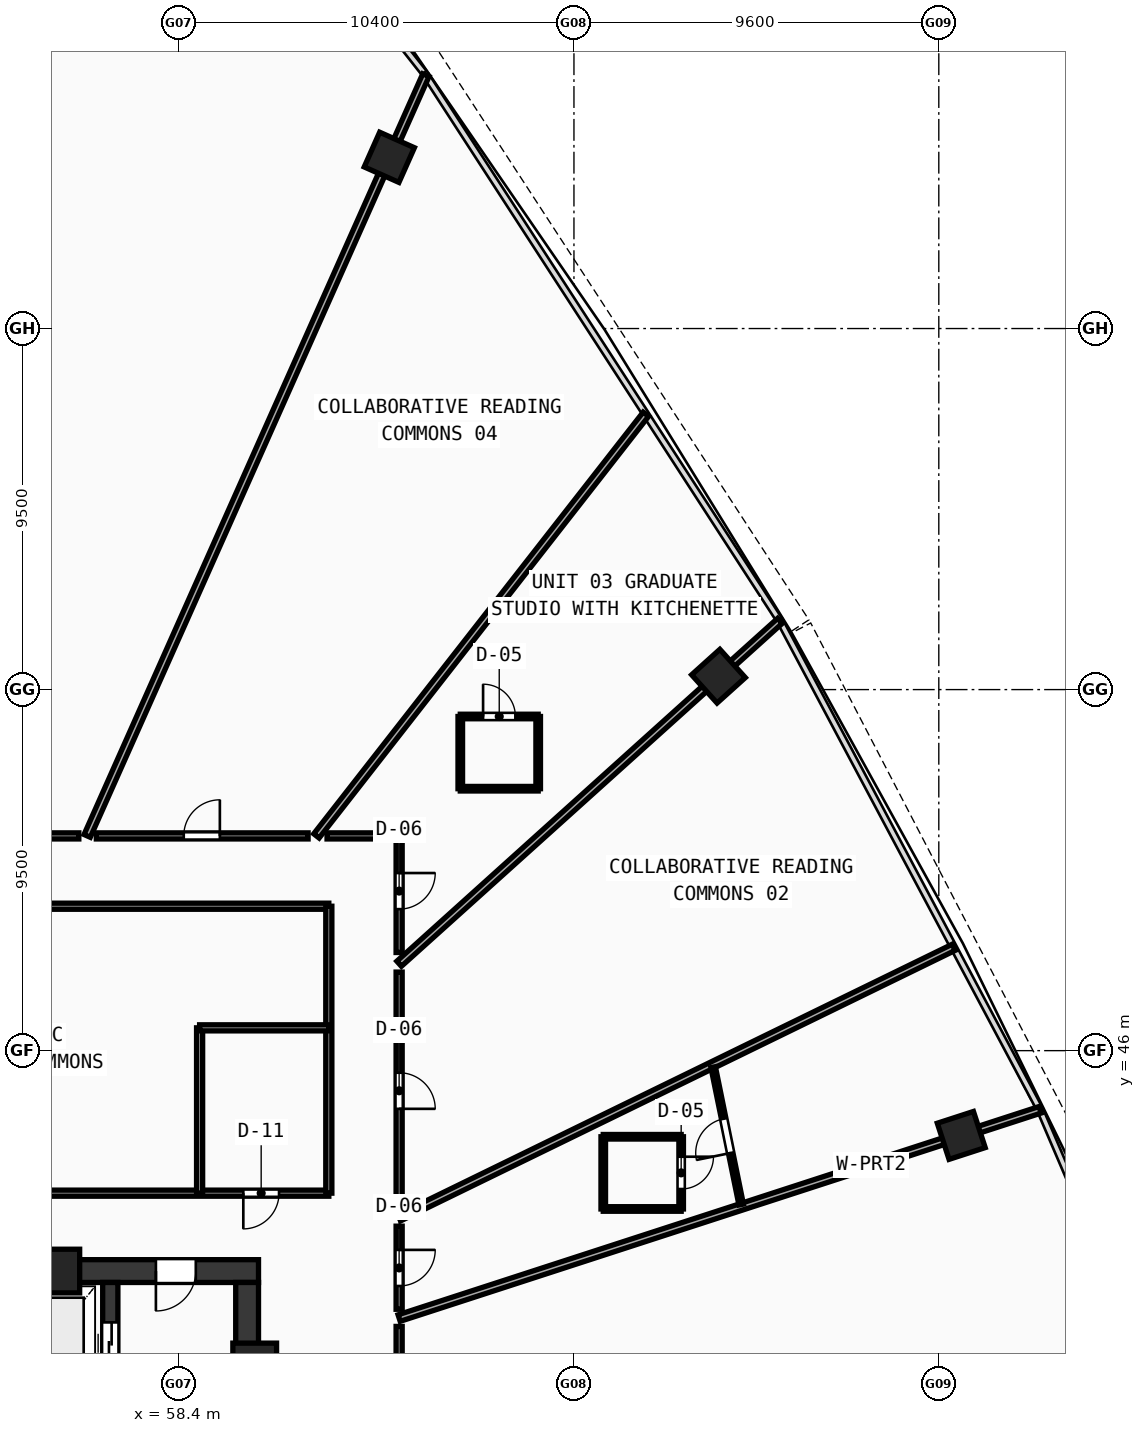
"""IFC4 building model, lengths in metres.
Left out: names, types, materials, properties, quantities, classifications, styles, units other than length and angle.
Written with IfcOpenShell. Run it as: python <this file> out.ifc"""

import sys

from ifc_helpers import new_model, si_unit, direction, frame, frame_2d, origin, origin_with_axes, origin_2d, place, context, subcontext, project, spatial, rectangle, hollow_rectangle, extrude, source, transform, mapped, element, fill, save


model = new_model("IFC4")
c1 = context("Model", 3, precision=1e-05, world=origin(), true_north=direction((0.0, 1.0)))
c2 = subcontext(c1, "Body", "Model", "MODEL_VIEW")
j1 = project(units=[si_unit("LENGTHUNIT", "METRE"), si_unit("PLANEANGLEUNIT", "RADIAN")], contexts=[c1])
p1 = place(None, origin())
s1 = spatial("IfcSite", under=j1, at=p1, CompositionType="ELEMENT")
p2 = place(p1, origin())
s2 = spatial("IfcBuilding", under=s1, at=p2, CompositionType="ELEMENT")
p3 = place(p2, frame((0.0, 0.0, 84.98)))
s3 = spatial("IfcBuildingStorey", under=s2, at=p3, CompositionType="ELEMENT", Elevation=84.98)
p4 = place(p3, frame((49.2, 40.2, 0.0), z_axis=(0.0, 0.0, 1.0), x_axis=(1.0, 0.0, 0.0)))
e1 = element("IfcWall", 1, at=p4, inside=s3, PredefinedType="SHEAR", context=c2, shape_type="SweptSolid", body=[
    extrude(rectangle(XDim=11.3, YDim=0.6, at=frame_2d((5.65, 0.0))), origin(), (0.0, 0.0, 1.0), 3.54),
])
p5 = place(p4, frame((8.6, 0.0, 0.0)))
e2 = element("IfcOpeningElement", 2, at=p5, cuts=e1, PredefinedType="OPENING", context=c2, shape_type="SweptSolid", body=[
    extrude(rectangle(XDim=1.05, YDim=2.1, at=frame_2d((0.525, 1.05))), frame((0.0, 0.31, 0.0), z_axis=(0.0, -1.0, 0.0), x_axis=(1.0, 0.0, 0.0)), (0.0, 0.0, 1.0), 0.62),
])
p6 = place(p3, frame((60.2, 27.8, 0.0), z_axis=(0.0, 0.0, 1.0), x_axis=(0.0, 1.0, 0.0)))
e3 = element("IfcWall", 3, at=p6, inside=s3, PredefinedType="SHEAR", context=c2, shape_type="SweptSolid", body=[
    extrude(rectangle(XDim=12.1, YDim=0.6, at=frame_2d((6.05, 0.0))), origin(), (0.0, 0.0, 1.0), 3.54),
])
p7 = place(p3, frame((56.6, 27.8, 0.0), z_axis=(0.0, 0.0, 1.0), x_axis=(0.0, 1.0, 0.0)))
e4 = element("IfcWall", 4, at=p7, inside=s3, PredefinedType="SHEAR", context=c2, shape_type="SweptSolid", body=[
    extrude(rectangle(XDim=12.1, YDim=0.4, at=frame_2d((6.05, 0.0))), origin(), (0.0, 0.0, 1.0), 3.54),
])
p8 = place(p7, frame((9.95, 0.0, 0.0)))
e5 = element("IfcOpeningElement", 5, at=p8, cuts=e4, PredefinedType="OPENING", context=c2, shape_type="SweptSolid", body=[
    extrude(rectangle(XDim=1.1, YDim=2.1, at=frame_2d((0.55, 1.05))), frame((0.0, 0.21, 0.0), z_axis=(0.0, -1.0, 0.0), x_axis=(1.0, 0.0, 0.0)), (0.0, 0.0, 1.0), 0.42),
])
m1 = source(origin(), c2, "Body", "SweptSolid", [
    extrude(hollow_rectangle(XDim=1.15, YDim=1.15, WallThickness=0.048, at=origin_2d()), origin(), (0.0, 0.0, 1.0), 3.8),
])
for number, where, z_axis, x_axis in (
    (6, (60.4, 37.729, -0.26), (0.0, 0.0, 1.0), (1.0, 0.0, 0.0)),
    (7, (55.219, 40.2, -0.26), (0.0, 0.0, 1.0), (1.0, 0.0, 0.0)),
):
    element("IfcColumn", number, at=place(p3, frame(where, z_axis=z_axis, x_axis=x_axis)), inside=s3, PredefinedType="COLUMN", context=c2, shape_type="MappedRepresentation", body=[
        mapped(m1, transform((0.0, 0.0, 0.0), scale=1.0)),
    ])
m2 = source(origin(), c2, "Body", "SweptSolid", [
    extrude(hollow_rectangle(XDim=1.0, YDim=1.0, WallThickness=0.042, at=origin_2d()), origin(), (0.0, 0.0, 1.0), 3.8),
])
for number, where, z_axis, x_axis in (
    (8, (78.991, 43.77, -0.26), (0.0, 0.0, 1.0), (-0.309, 0.951, 0.0)),
    (9, (72.603, 55.852, -0.26), (0.0, 0.0, 1.0), (-0.669, 0.743, 0.0)),
    (10, (63.941, 69.505, -0.26), (0.0, 0.0, 1.0), (-0.914, 0.407, 0.0)),
):
    element("IfcColumn", number, at=place(p3, frame(where, z_axis=z_axis, x_axis=x_axis)), inside=s3, PredefinedType="COLUMN", context=c2, shape_type="MappedRepresentation", body=[
        mapped(m2, transform((0.0, 0.0, 0.0), scale=1.0)),
    ])
p9 = place(p3, frame((45.92, 42.25, 0.0), z_axis=(0.0, 0.0, 1.0), x_axis=(1.0, 0.0, 0.0)))
e11 = element("IfcWall", 11, at=p9, inside=s3, PredefinedType="PARTITIONING", context=c2, shape_type="SweptSolid", body=[
    extrude(rectangle(XDim=16.43, YDim=0.16, at=frame_2d((8.215, 0.0))), origin(), (0.0, 0.0, 1.0), 2.84),
])
p10 = place(p9, frame((2.1, 0.0, 0.0)))
e12 = element("IfcOpeningElement", 12, at=p10, cuts=e11, PredefinedType="OPENING", context=c2, shape_type="SweptSolid", body=[
    extrude(rectangle(XDim=0.92, YDim=2.1, at=frame_2d((0.46, 1.05))), frame((0.0, 0.09, 0.0), z_axis=(0.0, -1.0, 0.0), x_axis=(1.0, 0.0, 0.0)), (0.0, 0.0, 1.0), 0.18),
])
p11 = place(p9, frame((14.18, 0.0, 0.0)))
e13 = element("IfcOpeningElement", 13, at=p11, cuts=e11, PredefinedType="OPENING", context=c2, shape_type="SweptSolid", body=[
    extrude(rectangle(XDim=0.94, YDim=2.1, at=frame_2d((0.47, 1.05))), frame((0.0, 0.09, 0.0), z_axis=(0.0, -1.0, 0.0), x_axis=(1.0, 0.0, 0.0)), (0.0, 0.0, 1.0), 0.18),
])
p12 = place(p3, frame((45.92, 49.8, 0.0), z_axis=(0.0, 0.0, 1.0), x_axis=(1.0, 0.0, 0.0)))
e14 = element("IfcWall", 14, at=p12, inside=s3, PredefinedType="PARTITIONING", context=c2, shape_type="SweptSolid", body=[
    extrude(rectangle(XDim=16.43, YDim=0.16, at=frame_2d((8.215, 0.0))), origin(), (0.0, 0.0, 1.0), 2.84),
])
p13 = place(p3, frame((62.35, 42.25, 0.0), z_axis=(0.0, 0.0, 1.0), x_axis=(0.0, 1.0, 0.0)))
e15 = element("IfcWall", 15, at=p13, inside=s3, PredefinedType="PARTITIONING", context=c2, shape_type="SweptSolid", body=[
    extrude(rectangle(XDim=7.55, YDim=0.16, at=frame_2d((3.775, 0.0))), origin(), (0.0, 0.0, 1.0), 2.84),
])
p14 = place(p3, frame((58.95, 42.25, 0.0), z_axis=(0.0, 0.0, 1.0), x_axis=(0.0, 1.0, 0.0)))
e16 = element("IfcWall", 16, at=p14, inside=s3, PredefinedType="PARTITIONING", context=c2, shape_type="SweptSolid", body=[
    extrude(rectangle(XDim=4.35, YDim=0.16, at=frame_2d((2.175, 0.0))), origin(), (0.0, 0.0, 1.0), 2.84),
])
p15 = place(p3, frame((58.95, 46.6, 0.0), z_axis=(0.0, 0.0, 1.0), x_axis=(1.0, 0.0, 0.0)))
e17 = element("IfcWall", 17, at=p15, inside=s3, PredefinedType="PARTITIONING", context=c2, shape_type="SweptSolid", body=[
    extrude(rectangle(XDim=3.4, YDim=0.16, at=frame_2d((1.7, 0.0))), origin(), (0.0, 0.0, 1.0), 2.84),
])
p16 = place(p3, frame((64.2, 38.964, 0.0), z_axis=(0.0, 0.0, 1.0), x_axis=(0.951054301474, 0.309023810812, 0.0)))
e18 = element("IfcWall", 18, at=p16, inside=s3, PredefinedType="PARTITIONING", context=c2, shape_type="SweptSolid", body=[
    extrude(rectangle(XDim=17.733, YDim=0.18, at=frame_2d((8.867, 0.0))), origin(), (0.0, 0.0, 1.0), 2.84),
])
p17 = place(p3, frame((64.2, 41.601, 0.0), z_axis=(0.0, 0.0, 1.0), x_axis=(0.898796049991, 0.438367038588, 0.0)))
e19 = element("IfcWall", 19, at=p17, inside=s3, PredefinedType="PARTITIONING", context=c2, shape_type="SweptSolid", body=[
    extrude(rectangle(XDim=16.234, YDim=0.18, at=frame_2d((8.117, 0.0))), origin(), (0.0, 0.0, 1.0), 2.84),
])
p18 = place(p3, frame((64.2, 48.287, 0.0), z_axis=(0.0, 0.0, 1.0), x_axis=(0.743149168899, 0.669125782469, 0.0)))
e20 = element("IfcWall", 20, at=p18, inside=s3, PredefinedType="PARTITIONING", context=c2, shape_type="SweptSolid", body=[
    extrude(rectangle(XDim=13.483, YDim=0.18, at=frame_2d((6.741, 0.0))), origin(), (0.0, 0.0, 1.0), 2.84),
])
p19 = place(p3, frame((62.024, 51.65, 0.0), z_axis=(0.0, 0.0, 1.0), x_axis=(0.615647406864, 0.788021744891, 0.0)))
e21 = element("IfcWall", 21, at=p19, inside=s3, PredefinedType="PARTITIONING", context=c2, shape_type="SweptSolid", body=[
    extrude(rectangle(XDim=14.08, YDim=0.18, at=frame_2d((7.04, 0.0))), origin(), (0.0, 0.0, 1.0), 2.84),
])
p20 = place(p3, frame((55.992, 51.65, 0.0), z_axis=(0.0, 0.0, 1.0), x_axis=(0.406733854264, 0.913546699296, 0.0)))
e22 = element("IfcWall", 22, at=p20, inside=s3, PredefinedType="PARTITIONING", context=c2, shape_type="SweptSolid", body=[
    extrude(rectangle(XDim=21.911, YDim=0.18, at=frame_2d((10.956, 0.0))), origin(), (0.0, 0.0, 1.0), 2.84),
])
p21 = place(p3, frame((45.85, 51.65, 0.0), z_axis=(0.0, 0.0, 1.0), x_axis=(1.0, 0.0, 0.0)))
e23 = element("IfcWall", 23, at=p21, inside=s3, PredefinedType="PARTITIONING", context=c2, shape_type="SweptSolid", body=[
    extrude(rectangle(XDim=9.922, YDim=0.16, at=frame_2d((4.961, 0.0))), origin(), (0.0, 0.0, 1.0), 2.84),
])
p22 = place(p21, frame((4.366, 0.0, 0.0)))
e24 = element("IfcOpeningElement", 24, at=p22, cuts=e23, PredefinedType="OPENING", context=c2, shape_type="SweptSolid", body=[
    extrude(rectangle(XDim=0.95, YDim=2.1, at=frame_2d((0.475, 1.05))), frame((0.0, 0.09, 0.0), z_axis=(0.0, -1.0, 0.0), x_axis=(1.0, 0.0, 0.0)), (0.0, 0.0, 1.0), 0.18),
])
p23 = place(p3, frame((56.233, 51.65, 0.0), z_axis=(0.0, 0.0, 1.0), x_axis=(1.0, 0.0, 0.0)))
e25 = element("IfcWall", 25, at=p23, inside=s3, PredefinedType="PARTITIONING", context=c2, shape_type="SweptSolid", body=[
    extrude(rectangle(XDim=5.572, YDim=0.16, at=frame_2d((2.786, 0.0))), origin(), (0.0, 0.0, 1.0), 3.54),
])
p24 = place(p23, frame((2.3, 0.0, 0.0)))
e26 = element("IfcOpeningElement", 26, at=p24, cuts=e25, PredefinedType="OPENING", context=c2, shape_type="SweptSolid", body=[
    extrude(rectangle(XDim=0.95, YDim=2.1, at=frame_2d((0.475, 1.05))), frame((0.0, 0.09, 0.0), z_axis=(0.0, -1.0, 0.0), x_axis=(1.0, 0.0, 0.0)), (0.0, 0.0, 1.0), 0.18),
])
p25 = place(p3, frame((62.303, 51.65, 0.0), z_axis=(0.0, 0.0, 1.0), x_axis=(1.0, 0.0, 0.0)))
e27 = element("IfcWall", 27, at=p25, inside=s3, PredefinedType="PARTITIONING", context=c2, shape_type="SweptSolid", body=[
    extrude(rectangle(XDim=1.897, YDim=0.16, at=frame_2d((0.948, 0.0))), origin(), (0.0, 0.0, 1.0), 3.54),
])
p26 = place(p3, frame((64.2, 51.65, 0.0), z_axis=(0.0, 0.0, 1.0), x_axis=(0.0, -1.0, 0.0)))
e28 = element("IfcWall", 28, at=p26, inside=s3, PredefinedType="PARTITIONING", context=c2, shape_type="SweptSolid", body=[
    extrude(rectangle(XDim=3.067, YDim=0.16, at=frame_2d((1.534, 0.0))), origin(), (0.0, 0.0, 1.0), 3.54),
])
p27 = place(p26, frame((0.977, 0.0, 0.0)))
e29 = element("IfcOpeningElement", 29, at=p27, cuts=e28, PredefinedType="OPENING", context=c2, shape_type="SweptSolid", body=[
    extrude(rectangle(XDim=0.95, YDim=2.1, at=frame_2d((0.475, 1.05))), frame((0.0, 0.09, 0.0), z_axis=(0.0, -1.0, 0.0), x_axis=(1.0, 0.0, 0.0)), (0.0, 0.0, 1.0), 0.18),
])
p28 = place(p3, frame((64.2, 48.067, 0.0), z_axis=(0.0, 0.0, 1.0), x_axis=(0.0, -1.0, 0.0)))
e30 = element("IfcWall", 30, at=p28, inside=s3, PredefinedType="PARTITIONING", context=c2, shape_type="SweptSolid", body=[
    extrude(rectangle(XDim=6.221, YDim=0.16, at=frame_2d((3.11, 0.0))), origin(), (0.0, 0.0, 1.0), 2.84),
])
p29 = place(p28, frame((2.648, 0.0, 0.0)))
e31 = element("IfcOpeningElement", 31, at=p29, cuts=e30, PredefinedType="OPENING", context=c2, shape_type="SweptSolid", body=[
    extrude(rectangle(XDim=0.95, YDim=2.1, at=frame_2d((0.475, 1.05))), frame((0.0, 0.09, 0.0), z_axis=(0.0, -1.0, 0.0), x_axis=(1.0, 0.0, 0.0)), (0.0, 0.0, 1.0), 0.18),
])
p30 = place(p3, frame((64.2, 41.382, 0.0), z_axis=(0.0, 0.0, 1.0), x_axis=(0.0, -1.0, 0.0)))
e32 = element("IfcWall", 32, at=p30, inside=s3, PredefinedType="PARTITIONING", context=c2, shape_type="SweptSolid", body=[
    extrude(rectangle(XDim=2.187, YDim=0.16, at=frame_2d((1.093, 0.0))), origin(), (0.0, 0.0, 1.0), 3.54),
])
p31 = place(p30, frame((0.624, 0.0, 0.0)))
e33 = element("IfcOpeningElement", 33, at=p31, cuts=e32, PredefinedType="OPENING", context=c2, shape_type="SweptSolid", body=[
    extrude(rectangle(XDim=0.95, YDim=2.1, at=frame_2d((0.475, 1.05))), frame((0.0, 0.09, 0.0), z_axis=(0.0, -1.0, 0.0), x_axis=(1.0, 0.0, 0.0)), (0.0, 0.0, 1.0), 0.18),
])
p32 = place(p3, frame((64.2, 38.744, 0.0), z_axis=(0.0, 0.0, 1.0), x_axis=(0.0, -1.0, 0.0)))
e34 = element("IfcWall", 34, at=p32, inside=s3, PredefinedType="PARTITIONING", context=c2, shape_type="SweptSolid", body=[
    extrude(rectangle(XDim=13.944, YDim=0.16, at=frame_2d((6.972, 0.0))), origin(), (0.0, 0.0, 1.0), 2.84),
])
p33 = place(p32, frame((6.617, 0.0, 0.0)))
e35 = element("IfcOpeningElement", 35, at=p33, cuts=e34, PredefinedType="OPENING", context=c2, shape_type="SweptSolid", body=[
    extrude(rectangle(XDim=0.95, YDim=2.1, at=frame_2d((0.475, 1.05))), frame((0.0, 0.09, 0.0), z_axis=(0.0, -1.0, 0.0), x_axis=(1.0, 0.0, 0.0)), (0.0, 0.0, 1.0), 0.18),
])
p34 = place(p3, frame((69.571, 41.834, 0.0), z_axis=(0.0, 0.0, 1.0), x_axis=(1.0, 0.0, 0.0)))
e36 = element("IfcWall", 36, at=p34, inside=s3, PredefinedType="PARTITIONING", context=c2, shape_type="SweptSolid", body=[
    extrude(rectangle(XDim=2.05, YDim=0.12, at=frame_2d((1.025, 0.0))), origin(), (0.0, 0.0, 1.0), 3.54),
])
p35 = place(p3, frame((71.621, 41.834, 0.0), z_axis=(0.0, 0.0, 1.0), x_axis=(0.0, 1.0, 0.0)))
e37 = element("IfcWall", 37, at=p35, inside=s3, PredefinedType="PARTITIONING", context=c2, shape_type="SweptSolid", body=[
    extrude(rectangle(XDim=1.9, YDim=0.12, at=frame_2d((0.95, 0.0))), origin(), (0.0, 0.0, 1.0), 3.14),
])
p36 = place(p35, frame((0.525, 0.0, 0.0)))
e38 = element("IfcOpeningElement", 38, at=p36, cuts=e37, PredefinedType="OPENING", context=c2, shape_type="SweptSolid", body=[
    extrude(rectangle(XDim=0.85, YDim=2.1, at=frame_2d((0.425, 1.05))), frame((0.0, 0.07, 0.0), z_axis=(0.0, -1.0, 0.0), x_axis=(1.0, 0.0, 0.0)), (0.0, 0.0, 1.0), 0.14),
])
p37 = place(p3, frame((71.621, 43.734, 0.0), z_axis=(0.0, 0.0, 1.0), x_axis=(-1.0, 0.0, 0.0)))
e39 = element("IfcWall", 39, at=p37, inside=s3, PredefinedType="PARTITIONING", context=c2, shape_type="SweptSolid", body=[
    extrude(rectangle(XDim=2.05, YDim=0.12, at=frame_2d((1.025, 0.0))), origin(), (0.0, 0.0, 1.0), 3.54),
])
p38 = place(p3, frame((69.571, 43.734, 0.0), z_axis=(0.0, 0.0, 1.0), x_axis=(0.0, -1.0, 0.0)))
e40 = element("IfcWall", 40, at=p38, inside=s3, PredefinedType="PARTITIONING", context=c2, shape_type="SweptSolid", body=[
    extrude(rectangle(XDim=1.9, YDim=0.12, at=frame_2d((0.95, 0.0))), origin(), (0.0, 0.0, 1.0), 3.54),
])
p39 = place(p3, frame((73.2, 41.951, 0.0), z_axis=(0.0, 0.0, 1.0), x_axis=(-0.199717476268, 0.979853524601, 0.0)))
e41 = element("IfcWall", 41, at=p39, inside=s3, PredefinedType="PARTITIONING", context=c2, shape_type="SweptSolid", body=[
    extrude(rectangle(XDim=3.688, YDim=0.12, at=frame_2d((1.844, 0.0))), origin(), (0.0, 0.0, 1.0), 2.84),
])
p40 = place(p39, frame((1.384, 0.0, 0.0)))
e42 = element("IfcOpeningElement", 42, at=p40, cuts=e41, PredefinedType="OPENING", context=c2, shape_type="SweptSolid", body=[
    extrude(rectangle(XDim=0.92, YDim=2.1, at=frame_2d((0.46, 1.05))), frame((0.0, 0.07, 0.0), z_axis=(0.0, -1.0, 0.0), x_axis=(1.0, 0.0, 0.0)), (0.0, 0.0, 1.0), 0.14),
])
p41 = place(p3, frame((65.809, 52.892, 0.0), z_axis=(0.0, 0.0, 1.0), x_axis=(1.0, 0.0, 0.0)))
e43 = element("IfcWall", 43, at=p41, inside=s3, PredefinedType="PARTITIONING", context=c2, shape_type="SweptSolid", body=[
    extrude(rectangle(XDim=2.05, YDim=0.12, at=frame_2d((1.025, 0.0))), origin(), (0.0, 0.0, 1.0), 3.54),
])
p42 = place(p3, frame((67.859, 52.892, 0.0), z_axis=(0.0, 0.0, 1.0), x_axis=(0.0, 1.0, 0.0)))
e44 = element("IfcWall", 44, at=p42, inside=s3, PredefinedType="PARTITIONING", context=c2, shape_type="SweptSolid", body=[
    extrude(rectangle(XDim=1.9, YDim=0.12, at=frame_2d((0.95, 0.0))), origin(), (0.0, 0.0, 1.0), 3.54),
])
p43 = place(p3, frame((67.859, 54.792, 0.0), z_axis=(0.0, 0.0, 1.0), x_axis=(-1.0, 0.0, 0.0)))
e45 = element("IfcWall", 45, at=p43, inside=s3, PredefinedType="PARTITIONING", context=c2, shape_type="SweptSolid", body=[
    extrude(rectangle(XDim=2.05, YDim=0.12, at=frame_2d((1.025, 0.0))), origin(), (0.0, 0.0, 1.0), 3.54),
])
p44 = place(p43, frame((0.6, 0.0, 0.0)))
e46 = element("IfcOpeningElement", 46, at=p44, cuts=e45, PredefinedType="OPENING", context=c2, shape_type="SweptSolid", body=[
    extrude(rectangle(XDim=0.85, YDim=2.1, at=frame_2d((0.425, 1.05))), frame((0.0, 0.07, 0.0), z_axis=(0.0, -1.0, 0.0), x_axis=(1.0, 0.0, 0.0)), (0.0, 0.0, 1.0), 0.14),
])
p45 = place(p3, frame((65.809, 54.792, 0.0), z_axis=(0.0, 0.0, 1.0), x_axis=(0.0, -1.0, 0.0)))
e47 = element("IfcWall", 47, at=p45, inside=s3, PredefinedType="PARTITIONING", context=c2, shape_type="SweptSolid", body=[
    extrude(rectangle(XDim=1.9, YDim=0.12, at=frame_2d((0.95, 0.0))), origin(), (0.0, 0.0, 1.0), 3.54),
])
m3 = source(origin(), c2, "Body", "SweptSolid", [
    extrude(rectangle(XDim=1.05, YDim=2.1, at=frame_2d((0.525, 1.05))), frame((0.0, 0.025, 0.0), z_axis=(0.0, -1.0, 0.0), x_axis=(1.0, 0.0, 0.0)), (0.0, 0.0, 1.0), 0.05),
])
p46 = place(p5, frame((1.05, 0.0, 0.0), z_axis=(0.0, 0.0, 1.0), x_axis=(-1.0, 0.0, 0.0)))
e48 = element("IfcDoor", 48, at=p46, inside=s3, OperationType="SINGLE_SWING_RIGHT", PredefinedType="DOOR", context=c2, shape_type="MappedRepresentation", body=[
    mapped(m3, transform((0.0, 0.0, 0.0), scale=1.0)),
])
fill(e2, e48)
m4 = source(origin(), c2, "Body", "SweptSolid", [
    extrude(rectangle(XDim=1.1, YDim=2.1, at=frame_2d((0.55, 1.05))), frame((0.0, 0.025, 0.0), z_axis=(0.0, -1.0, 0.0), x_axis=(1.0, 0.0, 0.0)), (0.0, 0.0, 1.0), 0.05),
])
p47 = place(p8, origin_with_axes())
e49 = element("IfcDoor", 49, at=p47, inside=s3, OperationType="DOUBLE_DOOR_SLIDING", PredefinedType="DOOR", context=c2, shape_type="MappedRepresentation", body=[
    mapped(m4, transform((0.0, 0.0, 0.0), scale=1.0)),
])
fill(e5, e49)
m5 = source(origin(), c2, "Body", "SweptSolid", [
    extrude(rectangle(XDim=0.94, YDim=2.1, at=frame_2d((0.47, 1.05))), frame((0.0, 0.025, 0.0), z_axis=(0.0, -1.0, 0.0), x_axis=(1.0, 0.0, 0.0)), (0.0, 0.0, 1.0), 0.05),
])
p48 = place(p11, frame((0.94, 0.0, 0.0), z_axis=(0.0, 0.0, 1.0), x_axis=(-1.0, 0.0, 0.0)))
e50 = element("IfcDoor", 50, at=p48, inside=s3, OperationType="SINGLE_SWING_RIGHT", PredefinedType="DOOR", context=c2, shape_type="MappedRepresentation", body=[
    mapped(m5, transform((0.0, 0.0, 0.0), scale=1.0)),
])
fill(e13, e50)
m6 = source(origin(), c2, "Body", "SweptSolid", [
    extrude(rectangle(XDim=0.95, YDim=2.1, at=frame_2d((0.475, 1.05))), frame((0.0, 0.025, 0.0), z_axis=(0.0, -1.0, 0.0), x_axis=(1.0, 0.0, 0.0)), (0.0, 0.0, 1.0), 0.05),
])
p49 = place(p31, origin_with_axes())
e51 = element("IfcDoor", 51, at=p49, inside=s3, OperationType="SINGLE_SWING_LEFT", PredefinedType="DOOR", context=c2, shape_type="MappedRepresentation", body=[
    mapped(m6, transform((0.0, 0.0, 0.0), scale=1.0)),
])
fill(e33, e51)
m7 = source(origin(), c2, "Body", "SweptSolid", [
    extrude(rectangle(XDim=0.85, YDim=2.1, at=frame_2d((0.425, 1.05))), frame((0.0, 0.025, 0.0), z_axis=(0.0, -1.0, 0.0), x_axis=(1.0, 0.0, 0.0)), (0.0, 0.0, 1.0), 0.05),
])
p50 = place(p36, frame((0.85, 0.0, 0.0), z_axis=(0.0, 0.0, 1.0), x_axis=(-1.0, 0.0, 0.0)))
e52 = element("IfcDoor", 52, at=p50, inside=s3, OperationType="SINGLE_SWING_LEFT", PredefinedType="DOOR", context=c2, shape_type="MappedRepresentation", body=[
    mapped(m7, transform((0.0, 0.0, 0.0), scale=1.0)),
])
fill(e38, e52)
m8 = source(origin(), c2, "Body", "SweptSolid", [
    extrude(rectangle(XDim=0.92, YDim=2.1, at=frame_2d((0.46, 1.05))), frame((0.0, 0.025, 0.0), z_axis=(0.0, -1.0, 0.0), x_axis=(1.0, 0.0, 0.0)), (0.0, 0.0, 1.0), 0.05),
])
p51 = place(p40, origin_with_axes())
e53 = element("IfcDoor", 53, at=p51, inside=s3, OperationType="SINGLE_SWING_LEFT", PredefinedType="DOOR", context=c2, shape_type="MappedRepresentation", body=[
    mapped(m8, transform((0.0, 0.0, 0.0), scale=1.0)),
])
fill(e42, e53)
p52 = place(p29, origin_with_axes())
e54 = element("IfcDoor", 54, at=p52, inside=s3, OperationType="SINGLE_SWING_RIGHT", PredefinedType="DOOR", context=c2, shape_type="MappedRepresentation", body=[
    mapped(m6, transform((0.0, 0.0, 0.0), scale=1.0)),
])
fill(e31, e54)
p53 = place(p27, origin_with_axes())
e55 = element("IfcDoor", 55, at=p53, inside=s3, OperationType="SINGLE_SWING_LEFT", PredefinedType="DOOR", context=c2, shape_type="MappedRepresentation", body=[
    mapped(m6, transform((0.0, 0.0, 0.0), scale=1.0)),
])
fill(e29, e55)
p54 = place(p44, frame((0.85, 0.0, 0.0), z_axis=(0.0, 0.0, 1.0), x_axis=(-1.0, 0.0, 0.0)))
e56 = element("IfcDoor", 56, at=p54, inside=s3, OperationType="SINGLE_SWING_LEFT", PredefinedType="DOOR", context=c2, shape_type="MappedRepresentation", body=[
    mapped(m7, transform((0.0, 0.0, 0.0), scale=1.0)),
])
fill(e46, e56)
p55 = place(p24, origin_with_axes())
e57 = element("IfcDoor", 57, at=p55, inside=s3, OperationType="SINGLE_SWING_RIGHT", PredefinedType="DOOR", context=c2, shape_type="MappedRepresentation", body=[
    mapped(m6, transform((0.0, 0.0, 0.0), scale=1.0)),
])
fill(e26, e57)
save(model, sys.argv[1])
